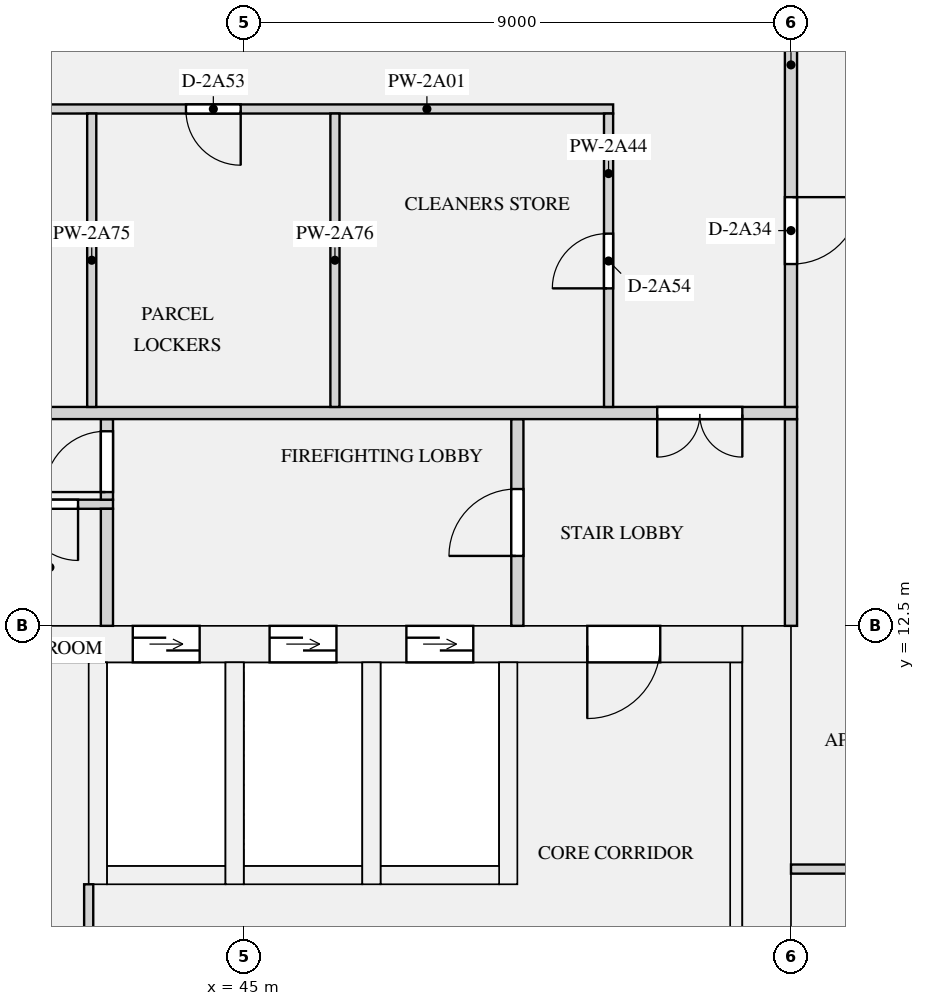
"""IFC4 building model, lengths in metres.
Left out: names, types, materials, properties, quantities, classifications, styles, units other than length and angle.
Written with IfcOpenShell. Run it as: python <this file> out.ifc"""

import sys

from ifc_helpers import new_model, si_unit, direction, frame, frame_2d, origin, place, context, subcontext, project, spatial, rectangle, extrude, element, fill, save


model = new_model("IFC4")
c1 = context("Model", 3, precision=1e-05, world=origin(), true_north=direction((0.0, 1.0)))
c2 = subcontext(c1, "Body", "Model", "MODEL_VIEW")
j1 = project(units=[si_unit("LENGTHUNIT", "METRE"), si_unit("PLANEANGLEUNIT", "RADIAN")], contexts=[c1])
p1 = place(None, origin())
s1 = spatial("IfcSite", under=j1, at=p1, CompositionType="ELEMENT")
p2 = place(p1, origin())
s2 = spatial("IfcBuilding", under=s1, at=p2, CompositionType="ELEMENT")
p3 = place(p2, frame((0.0, 0.0, 83.55)))
s3 = spatial("IfcBuildingStorey", under=s2, at=p3, CompositionType="ELEMENT", Elevation=83.55)
p4 = place(p3, frame((53.6, 0.0, 0.0), z_axis=(0.0, 0.0, 1.0), x_axis=(0.0, 1.0, 0.0)))
e1 = element("IfcWall", 1, at=p4, inside=s3, PredefinedType="SHEAR", context=c2, shape_type="SweptSolid", body=[
    extrude(rectangle(XDim=12.5, YDim=0.8, at=frame_2d((6.25, 0.0))), origin(), (0.0, 0.0, 1.0), 3.15),
])
p5 = place(p3, frame((18.8, 12.2, 0.0), z_axis=(0.0, 0.0, 1.0), x_axis=(1.0, 0.0, 0.0)))
e2 = element("IfcWall", 2, at=p5, inside=s3, PredefinedType="SHEAR", context=c2, shape_type="SweptSolid", body=[
    extrude(rectangle(XDim=34.4, YDim=0.6, at=frame_2d((17.2, 0.0))), origin(), (0.0, 0.0, 1.0), 3.15),
])
p6 = place(p5, frame((24.375, 0.0, 0.0)))
e3 = element("IfcOpeningElement", 3, at=p6, cuts=e2, PredefinedType="OPENING", context=c2, shape_type="SweptSolid", body=[
    extrude(rectangle(XDim=1.1, YDim=2.1, at=frame_2d((0.55, 1.05))), frame((0.0, 0.31, 0.0), z_axis=(0.0, -1.0, 0.0), x_axis=(1.0, 0.0, 0.0)), (0.0, 0.0, 1.0), 0.62),
])
p7 = place(p5, frame((26.625, 0.0, 0.0)))
e4 = element("IfcOpeningElement", 4, at=p7, cuts=e2, PredefinedType="OPENING", context=c2, shape_type="SweptSolid", body=[
    extrude(rectangle(XDim=1.1, YDim=2.1, at=frame_2d((0.55, 1.05))), frame((0.0, 0.31, 0.0), z_axis=(0.0, -1.0, 0.0), x_axis=(1.0, 0.0, 0.0)), (0.0, 0.0, 1.0), 0.62),
])
p8 = place(p5, frame((28.875, 0.0, 0.0)))
e5 = element("IfcOpeningElement", 5, at=p8, cuts=e2, PredefinedType="OPENING", context=c2, shape_type="SweptSolid", body=[
    extrude(rectangle(XDim=1.1, YDim=2.1, at=frame_2d((0.55, 1.05))), frame((0.0, 0.31, 0.0), z_axis=(0.0, -1.0, 0.0), x_axis=(1.0, 0.0, 0.0)), (0.0, 0.0, 1.0), 0.62),
])
p9 = place(p5, frame((14.25, 0.0, 0.0)))
e6 = element("IfcOpeningElement", 6, at=p9, cuts=e2, PredefinedType="OPENING", context=c2, shape_type="SweptSolid", body=[
    extrude(rectangle(XDim=0.9, YDim=2.1, at=frame_2d((0.45, 1.05))), frame((0.0, 0.31, 0.0), z_axis=(0.0, -1.0, 0.0), x_axis=(1.0, 0.0, 0.0)), (0.0, 0.0, 1.0), 0.62),
])
p10 = place(p5, frame((1.35, 0.0, 0.0)))
e7 = element("IfcOpeningElement", 7, at=p10, cuts=e2, PredefinedType="OPENING", context=c2, shape_type="SweptSolid", body=[
    extrude(rectangle(XDim=1.2, YDim=2.1, at=frame_2d((0.6, 1.05))), frame((0.0, 0.31, 0.0), z_axis=(0.0, -1.0, 0.0), x_axis=(1.0, 0.0, 0.0)), (0.0, 0.0, 1.0), 0.62),
])
p11 = place(p5, frame((31.85, 0.0, 0.0)))
e8 = element("IfcOpeningElement", 8, at=p11, cuts=e2, PredefinedType="OPENING", context=c2, shape_type="SweptSolid", body=[
    extrude(rectangle(XDim=1.2, YDim=2.1, at=frame_2d((0.6, 1.05))), frame((0.0, 0.31, 0.0), z_axis=(0.0, -1.0, 0.0), x_axis=(1.0, 0.0, 0.0)), (0.0, 0.0, 1.0), 0.62),
])
p12 = place(p3, frame((53.1, 1.0, 0.0), z_axis=(0.0, 0.0, 1.0), x_axis=(0.0, 1.0, 0.0)))
e9 = element("IfcWall", 9, at=p12, inside=s3, PredefinedType="SHEAR", context=c2, shape_type="SweptSolid", body=[
    extrude(rectangle(XDim=10.9, YDim=0.2, at=frame_2d((5.45, 0.0))), origin(), (0.0, 0.0, 1.0), 3.15),
])
p13 = place(p3, frame((42.75, 8.4, 0.0), z_axis=(0.0, 0.0, 1.0), x_axis=(1.0, 0.0, 0.0)))
e10 = element("IfcWall", 10, at=p13, inside=s3, PredefinedType="SHEAR", context=c2, shape_type="SweptSolid", body=[
    extrude(rectangle(XDim=1.95, YDim=0.3, at=frame_2d((0.975, 0.0))), origin(), (0.0, 0.0, 1.0), 3.15),
])
p14 = place(p3, frame((42.6, 8.25, 0.0), z_axis=(0.0, 0.0, 1.0), x_axis=(0.0, 1.0, 0.0)))
e11 = element("IfcWall", 11, at=p14, inside=s3, PredefinedType="SHEAR", context=c2, shape_type="SweptSolid", body=[
    extrude(rectangle(XDim=3.65, YDim=0.3, at=frame_2d((1.825, 0.0))), origin(), (0.0, 0.0, 1.0), 3.15),
])
p15 = place(p3, frame((45.0, 8.4, 0.0), z_axis=(0.0, 0.0, 1.0), x_axis=(1.0, 0.0, 0.0)))
e12 = element("IfcWall", 12, at=p15, inside=s3, PredefinedType="SHEAR", context=c2, shape_type="SweptSolid", body=[
    extrude(rectangle(XDim=1.95, YDim=0.3, at=frame_2d((0.975, 0.0))), origin(), (0.0, 0.0, 1.0), 3.15),
])
p16 = place(p3, frame((44.85, 8.25, 0.0), z_axis=(0.0, 0.0, 1.0), x_axis=(0.0, 1.0, 0.0)))
e13 = element("IfcWall", 13, at=p16, inside=s3, PredefinedType="SHEAR", context=c2, shape_type="SweptSolid", body=[
    extrude(rectangle(XDim=3.65, YDim=0.3, at=frame_2d((1.825, 0.0))), origin(), (0.0, 0.0, 1.0), 3.15),
])
p17 = place(p3, frame((47.25, 8.4, 0.0), z_axis=(0.0, 0.0, 1.0), x_axis=(1.0, 0.0, 0.0)))
e14 = element("IfcWall", 14, at=p17, inside=s3, PredefinedType="SHEAR", context=c2, shape_type="SweptSolid", body=[
    extrude(rectangle(XDim=1.95, YDim=0.3, at=frame_2d((0.975, 0.0))), origin(), (0.0, 0.0, 1.0), 3.15),
])
for number, where, z_axis, x_axis in (
    (15, (47.1, 8.25, 0.0), (0.0, 0.0, 1.0), (0.0, 1.0, 0.0)),
    (16, (49.35, 8.25, 0.0), (0.0, 0.0, 1.0), (0.0, 1.0, 0.0)),
):
    element("IfcWall", number, at=place(p3, frame(where, z_axis=z_axis, x_axis=x_axis)), inside=s3, PredefinedType="SHEAR", context=c2, shape_type="SweptSolid", body=[
        extrude(rectangle(XDim=3.65, YDim=0.3, at=frame_2d((1.825, 0.0))), origin(), (0.0, 0.0, 1.0), 3.15),
    ])
p18 = place(p3, frame((38.925, 14.5, 0.0), z_axis=(0.0, 0.0, 1.0), x_axis=(1.0, 0.0, 0.0)))
e17 = element("IfcWall", 17, at=p18, inside=s3, PredefinedType="PARTITIONING", context=c2, shape_type="SweptSolid", body=[
    extrude(rectangle(XDim=3.925, YDim=0.15, at=frame_2d((1.962, 0.0))), origin(), (0.0, 0.0, 1.0), 2.83),
])
p19 = place(p18, frame((0.575, 0.0, 0.0)))
e18 = element("IfcOpeningElement", 18, at=p19, cuts=e17, PredefinedType="OPENING", context=c2, shape_type="SweptSolid", body=[
    extrude(rectangle(XDim=0.9, YDim=2.1, at=frame_2d((0.45, 1.05))), frame((0.0, 0.085, 0.0), z_axis=(0.0, -1.0, 0.0), x_axis=(1.0, 0.0, 0.0)), (0.0, 0.0, 1.0), 0.17),
])
p20 = place(p18, frame((2.45, 0.0, 0.0)))
e19 = element("IfcOpeningElement", 19, at=p20, cuts=e17, PredefinedType="OPENING", context=c2, shape_type="SweptSolid", body=[
    extrude(rectangle(XDim=0.9, YDim=2.1, at=frame_2d((0.45, 1.05))), frame((0.0, 0.085, 0.0), z_axis=(0.0, -1.0, 0.0), x_axis=(1.0, 0.0, 0.0)), (0.0, 0.0, 1.0), 0.17),
])
p21 = place(p3, frame((42.45, 6.65, 0.0), z_axis=(0.0, 0.0, 1.0), x_axis=(0.0, 1.0, 0.0)))
e20 = element("IfcWall", 20, at=p21, inside=s3, PredefinedType="PARTITIONING", context=c2, shape_type="SweptSolid", body=[
    extrude(rectangle(XDim=1.6, YDim=0.15, at=frame_2d((0.8, 0.0))), origin(), (0.0, 0.0, 1.0), 2.83),
])
p22 = place(p3, frame((42.75, 12.5, 0.0), z_axis=(0.0, 0.0, 1.0), x_axis=(0.0, 1.0, 0.0)))
e21 = element("IfcWall", 21, at=p22, inside=s3, PredefinedType="PARTITIONING", context=c2, shape_type="SweptSolid", body=[
    extrude(rectangle(XDim=1.925, YDim=0.2, at=frame_2d((0.962, 0.0))), origin(), (0.0, 0.0, 1.0), 2.83),
])
p23 = place(p3, frame((49.5, 12.5, 0.0), z_axis=(0.0, 0.0, 1.0), x_axis=(0.0, 1.0, 0.0)))
e22 = element("IfcWall", 22, at=p23, inside=s3, PredefinedType="PARTITIONING", context=c2, shape_type="SweptSolid", body=[
    extrude(rectangle(XDim=3.4, YDim=0.2, at=frame_2d((1.7, 0.0))), origin(), (0.0, 0.0, 1.0), 2.83),
])
p24 = place(p23, frame((1.15, 0.0, 0.0)))
e23 = element("IfcOpeningElement", 23, at=p24, cuts=e22, PredefinedType="OPENING", context=c2, shape_type="SweptSolid", body=[
    extrude(rectangle(XDim=1.1, YDim=2.1, at=frame_2d((0.55, 1.05))), frame((0.0, 0.11, 0.0), z_axis=(0.0, -1.0, 0.0), x_axis=(1.0, 0.0, 0.0)), (0.0, 0.0, 1.0), 0.22),
])
p25 = place(p3, frame((54.0, 12.5, 0.0), z_axis=(0.0, 0.0, 1.0), x_axis=(0.0, 1.0, 0.0)))
e24 = element("IfcWall", 24, at=p25, inside=s3, PredefinedType="PARTITIONING", context=c2, shape_type="SweptSolid", body=[
    extrude(rectangle(XDim=3.4, YDim=0.2, at=frame_2d((1.7, 0.0))), origin(), (0.0, 0.0, 1.0), 2.83),
])
p26 = place(p3, frame((42.75, 14.575, 0.0), z_axis=(0.0, 0.0, 1.0), x_axis=(0.0, 1.0, 0.0)))
e25 = element("IfcWall", 25, at=p26, inside=s3, PredefinedType="PARTITIONING", context=c2, shape_type="SweptSolid", body=[
    extrude(rectangle(XDim=1.325, YDim=0.2, at=frame_2d((0.663, 0.0))), origin(), (0.0, 0.0, 1.0), 2.83),
])
p27 = place(p26, frame((0.125, 0.0, 0.0)))
e26 = element("IfcOpeningElement", 26, at=p27, cuts=e25, PredefinedType="OPENING", context=c2, shape_type="SweptSolid", body=[
    extrude(rectangle(XDim=1.0, YDim=2.1, at=frame_2d((0.5, 1.05))), frame((0.0, 0.11, 0.0), z_axis=(0.0, -1.0, 0.0), x_axis=(1.0, 0.0, 0.0)), (0.0, 0.0, 1.0), 0.22),
])
p28 = place(p3, frame((20.925, 21.0, 0.0), z_axis=(0.0, 0.0, 1.0), x_axis=(1.0, 0.0, 0.0)))
e27 = element("IfcWall", 27, at=p28, inside=s3, PredefinedType="PARTITIONING", context=c2, shape_type="SweptSolid", body=[
    extrude(rectangle(XDim=30.15, YDim=0.15, at=frame_2d((15.075, 0.0))), origin(), (0.0, 0.0, 1.0), 2.83),
])
p29 = place(p28, frame((2.875, 0.0, 0.0)))
e28 = element("IfcOpeningElement", 28, at=p29, cuts=e27, PredefinedType="OPENING", context=c2, shape_type="SweptSolid", body=[
    extrude(rectangle(XDim=0.9, YDim=2.1, at=frame_2d((0.45, 1.05))), frame((0.0, 0.085, 0.0), z_axis=(0.0, -1.0, 0.0), x_axis=(1.0, 0.0, 0.0)), (0.0, 0.0, 1.0), 0.17),
])
p30 = place(p28, frame((8.375, 0.0, 0.0)))
e29 = element("IfcOpeningElement", 29, at=p30, cuts=e27, PredefinedType="OPENING", context=c2, shape_type="SweptSolid", body=[
    extrude(rectangle(XDim=0.9, YDim=2.1, at=frame_2d((0.45, 1.05))), frame((0.0, 0.085, 0.0), z_axis=(0.0, -1.0, 0.0), x_axis=(1.0, 0.0, 0.0)), (0.0, 0.0, 1.0), 0.17),
])
p31 = place(p28, frame((13.375, 0.0, 0.0)))
e30 = element("IfcOpeningElement", 30, at=p31, cuts=e27, PredefinedType="OPENING", context=c2, shape_type="SweptSolid", body=[
    extrude(rectangle(XDim=0.9, YDim=2.1, at=frame_2d((0.45, 1.05))), frame((0.0, 0.085, 0.0), z_axis=(0.0, -1.0, 0.0), x_axis=(1.0, 0.0, 0.0)), (0.0, 0.0, 1.0), 0.17),
])
p32 = place(p28, frame((18.625, 0.0, 0.0)))
e31 = element("IfcOpeningElement", 31, at=p32, cuts=e27, PredefinedType="OPENING", context=c2, shape_type="SweptSolid", body=[
    extrude(rectangle(XDim=0.9, YDim=2.1, at=frame_2d((0.45, 1.05))), frame((0.0, 0.085, 0.0), z_axis=(0.0, -1.0, 0.0), x_axis=(1.0, 0.0, 0.0)), (0.0, 0.0, 1.0), 0.17),
])
p33 = place(p28, frame((23.125, 0.0, 0.0)))
e32 = element("IfcOpeningElement", 32, at=p33, cuts=e27, PredefinedType="OPENING", context=c2, shape_type="SweptSolid", body=[
    extrude(rectangle(XDim=0.9, YDim=2.1, at=frame_2d((0.45, 1.05))), frame((0.0, 0.085, 0.0), z_axis=(0.0, -1.0, 0.0), x_axis=(1.0, 0.0, 0.0)), (0.0, 0.0, 1.0), 0.17),
])
p34 = place(p3, frame((54.0, 8.5, 0.0), z_axis=(0.0, 0.0, 1.0), x_axis=(1.0, 0.0, 0.0)))
e33 = element("IfcWall", 33, at=p34, inside=s3, PredefinedType="PARTITIONING", context=c2, shape_type="SweptSolid", body=[
    extrude(rectangle(XDim=17.925, YDim=0.15, at=frame_2d((8.962, 0.0))), origin(), (0.0, 0.0, 1.0), 2.83),
])
p35 = place(p34, frame((1.8, 0.0, 0.0)))
e34 = element("IfcOpeningElement", 34, at=p35, cuts=e33, PredefinedType="OPENING", context=c2, shape_type="SweptSolid", body=[
    extrude(rectangle(XDim=0.9, YDim=2.1, at=frame_2d((0.45, 1.05))), frame((0.0, 0.085, 0.0), z_axis=(0.0, -1.0, 0.0), x_axis=(1.0, 0.0, 0.0)), (0.0, 0.0, 1.0), 0.17),
])
p36 = place(p34, frame((8.25, 0.0, 0.0)))
e35 = element("IfcOpeningElement", 35, at=p36, cuts=e33, PredefinedType="OPENING", context=c2, shape_type="SweptSolid", body=[
    extrude(rectangle(XDim=1.5, YDim=2.1, at=frame_2d((0.75, 1.05))), frame((0.0, 0.085, 0.0), z_axis=(0.0, -1.0, 0.0), x_axis=(1.0, 0.0, 0.0)), (0.0, 0.0, 1.0), 0.17),
])
p37 = place(p34, frame((15.3, 0.0, 0.0)))
e36 = element("IfcOpeningElement", 36, at=p37, cuts=e33, PredefinedType="OPENING", context=c2, shape_type="SweptSolid", body=[
    extrude(rectangle(XDim=0.9, YDim=2.1, at=frame_2d((0.45, 1.05))), frame((0.0, 0.085, 0.0), z_axis=(0.0, -1.0, 0.0), x_axis=(1.0, 0.0, 0.0)), (0.0, 0.0, 1.0), 0.17),
])
p38 = place(p3, frame((17.9, 16.0, 0.0), z_axis=(0.0, 0.0, 1.0), x_axis=(1.0, 0.0, 0.0)))
e37 = element("IfcWall", 37, at=p38, inside=s3, PredefinedType="PARTITIONING", context=c2, shape_type="SweptSolid", body=[
    extrude(rectangle(XDim=36.2, YDim=0.2, at=frame_2d((18.1, 0.0))), origin(), (0.0, 0.0, 1.0), 2.83),
])
p39 = place(p38, frame((0.9, 0.0, 0.0)))
e38 = element("IfcOpeningElement", 38, at=p39, cuts=e37, PredefinedType="OPENING", context=c2, shape_type="SweptSolid", body=[
    extrude(rectangle(XDim=1.4, YDim=2.1, at=frame_2d((0.7, 1.05))), frame((0.0, 0.11, 0.0), z_axis=(0.0, -1.0, 0.0), x_axis=(1.0, 0.0, 0.0)), (0.0, 0.0, 1.0), 0.22),
])
p40 = place(p38, frame((33.9, 0.0, 0.0)))
e39 = element("IfcOpeningElement", 39, at=p40, cuts=e37, PredefinedType="OPENING", context=c2, shape_type="SweptSolid", body=[
    extrude(rectangle(XDim=1.4, YDim=2.1, at=frame_2d((0.7, 1.05))), frame((0.0, 0.11, 0.0), z_axis=(0.0, -1.0, 0.0), x_axis=(1.0, 0.0, 0.0)), (0.0, 0.0, 1.0), 0.22),
])
p41 = place(p3, frame((54.0, 16.1, 0.0), z_axis=(0.0, 0.0, 1.0), x_axis=(0.0, 1.0, 0.0)))
e40 = element("IfcWall", 40, at=p41, inside=s3, PredefinedType="PARTITIONING", context=c2, shape_type="SweptSolid", body=[
    extrude(rectangle(XDim=7.8, YDim=0.2, at=frame_2d((3.9, 0.0))), origin(), (0.0, 0.0, 1.0), 2.83),
])
p42 = place(p41, frame((2.35, 0.0, 0.0)))
e41 = element("IfcOpeningElement", 41, at=p42, cuts=e40, PredefinedType="OPENING", context=c2, shape_type="SweptSolid", body=[
    extrude(rectangle(XDim=1.1, YDim=2.1, at=frame_2d((0.55, 1.05))), frame((0.0, 0.11, 0.0), z_axis=(0.0, -1.0, 0.0), x_axis=(1.0, 0.0, 0.0)), (0.0, 0.0, 1.0), 0.22),
])
p43 = place(p3, frame((51.0, 16.1, 0.0), z_axis=(0.0, 0.0, 1.0), x_axis=(0.0, 1.0, 0.0)))
e42 = element("IfcWall", 42, at=p43, inside=s3, PredefinedType="PARTITIONING", context=c2, shape_type="SweptSolid", body=[
    extrude(rectangle(XDim=4.825, YDim=0.15, at=frame_2d((2.413, 0.0))), origin(), (0.0, 0.0, 1.0), 2.83),
])
p44 = place(p43, frame((1.95, 0.0, 0.0)))
e43 = element("IfcOpeningElement", 43, at=p44, cuts=e42, PredefinedType="OPENING", context=c2, shape_type="SweptSolid", body=[
    extrude(rectangle(XDim=0.9, YDim=2.1, at=frame_2d((0.45, 1.05))), frame((0.0, 0.085, 0.0), z_axis=(0.0, -1.0, 0.0), x_axis=(1.0, 0.0, 0.0)), (0.0, 0.0, 1.0), 0.17),
])
for number, where, z_axis, x_axis in (
    (44, (42.5, 16.1, 0.0), (0.0, 0.0, 1.0), (0.0, 1.0, 0.0)),
    (45, (46.5, 16.1, 0.0), (0.0, 0.0, 1.0), (0.0, 1.0, 0.0)),
):
    element("IfcWall", number, at=place(p3, frame(where, z_axis=z_axis, x_axis=x_axis)), inside=s3, PredefinedType="PARTITIONING", context=c2, shape_type="SweptSolid", body=[
        extrude(rectangle(XDim=4.825, YDim=0.15, at=frame_2d((2.413, 0.0))), origin(), (0.0, 0.0, 1.0), 2.83),
    ])
p45 = place(p6, origin())
e46 = element("IfcDoor", 46, at=p45, inside=s3, OperationType="DOUBLE_DOOR_SLIDING", PredefinedType="DOOR", context=c2, shape_type="SweptSolid", body=[
    extrude(rectangle(XDim=1.1, YDim=2.1, at=frame_2d((0.55, 1.05))), frame((0.0, 0.025, 0.0), z_axis=(0.0, -1.0, 0.0), x_axis=(1.0, 0.0, 0.0)), (0.0, 0.0, 1.0), 0.05),
])
fill(e3, e46)
p46 = place(p7, origin())
e47 = element("IfcDoor", 47, at=p46, inside=s3, OperationType="DOUBLE_DOOR_SLIDING", PredefinedType="DOOR", context=c2, shape_type="SweptSolid", body=[
    extrude(rectangle(XDim=1.1, YDim=2.1, at=frame_2d((0.55, 1.05))), frame((0.0, 0.025, 0.0), z_axis=(0.0, -1.0, 0.0), x_axis=(1.0, 0.0, 0.0)), (0.0, 0.0, 1.0), 0.05),
])
fill(e4, e47)
p47 = place(p8, origin())
e48 = element("IfcDoor", 48, at=p47, inside=s3, OperationType="DOUBLE_DOOR_SLIDING", PredefinedType="DOOR", context=c2, shape_type="SweptSolid", body=[
    extrude(rectangle(XDim=1.1, YDim=2.1, at=frame_2d((0.55, 1.05))), frame((0.0, 0.025, 0.0), z_axis=(0.0, -1.0, 0.0), x_axis=(1.0, 0.0, 0.0)), (0.0, 0.0, 1.0), 0.05),
])
fill(e5, e48)
p48 = place(p20, frame((0.9, 0.0, 0.0), z_axis=(0.0, 0.0, 1.0), x_axis=(-1.0, 0.0, 0.0)))
e49 = element("IfcDoor", 49, at=p48, inside=s3, OperationType="SINGLE_SWING_LEFT", PredefinedType="DOOR", context=c2, shape_type="SweptSolid", body=[
    extrude(rectangle(XDim=0.9, YDim=2.1, at=frame_2d((0.45, 1.05))), frame((0.0, 0.025, 0.0), z_axis=(0.0, -1.0, 0.0), x_axis=(1.0, 0.0, 0.0)), (0.0, 0.0, 1.0), 0.05),
])
fill(e19, e49)
p49 = place(p11, frame((1.2, 0.0, 0.0), z_axis=(0.0, 0.0, 1.0), x_axis=(-1.0, 0.0, 0.0)))
e50 = element("IfcDoor", 50, at=p49, inside=s3, OperationType="SINGLE_SWING_RIGHT", PredefinedType="DOOR", context=c2, shape_type="SweptSolid", body=[
    extrude(rectangle(XDim=1.2, YDim=2.1, at=frame_2d((0.6, 1.05))), frame((0.0, 0.025, 0.0), z_axis=(0.0, -1.0, 0.0), x_axis=(1.0, 0.0, 0.0)), (0.0, 0.0, 1.0), 0.05),
])
fill(e8, e50)
p50 = place(p27, origin())
e51 = element("IfcDoor", 51, at=p50, inside=s3, OperationType="SINGLE_SWING_LEFT", PredefinedType="DOOR", context=c2, shape_type="SweptSolid", body=[
    extrude(rectangle(XDim=1.0, YDim=2.1, at=frame_2d((0.5, 1.05))), frame((0.0, 0.025, 0.0), z_axis=(0.0, -1.0, 0.0), x_axis=(1.0, 0.0, 0.0)), (0.0, 0.0, 1.0), 0.05),
])
fill(e26, e51)
p51 = place(p24, origin())
e52 = element("IfcDoor", 52, at=p51, inside=s3, OperationType="SINGLE_SWING_LEFT", PredefinedType="DOOR", context=c2, shape_type="SweptSolid", body=[
    extrude(rectangle(XDim=1.1, YDim=2.1, at=frame_2d((0.55, 1.05))), frame((0.0, 0.025, 0.0), z_axis=(0.0, -1.0, 0.0), x_axis=(1.0, 0.0, 0.0)), (0.0, 0.0, 1.0), 0.05),
])
fill(e23, e52)
p52 = place(p40, frame((1.4, 0.0, 0.0), z_axis=(0.0, 0.0, 1.0), x_axis=(-1.0, 0.0, 0.0)))
e53 = element("IfcDoor", 53, at=p52, inside=s3, OperationType="DOUBLE_DOOR_SINGLE_SWING", PredefinedType="DOOR", context=c2, shape_type="SweptSolid", body=[
    extrude(rectangle(XDim=1.4, YDim=2.1, at=frame_2d((0.7, 1.05))), frame((0.0, 0.025, 0.0), z_axis=(0.0, -1.0, 0.0), x_axis=(1.0, 0.0, 0.0)), (0.0, 0.0, 1.0), 0.05),
])
fill(e39, e53)
p53 = place(p42, frame((1.1, 0.0, 0.0), z_axis=(0.0, 0.0, 1.0), x_axis=(-1.0, 0.0, 0.0)))
e54 = element("IfcDoor", 54, at=p53, inside=s3, OperationType="SINGLE_SWING_LEFT", PredefinedType="DOOR", context=c2, shape_type="SweptSolid", body=[
    extrude(rectangle(XDim=1.1, YDim=2.1, at=frame_2d((0.55, 1.05))), frame((0.0, 0.025, 0.0), z_axis=(0.0, -1.0, 0.0), x_axis=(1.0, 0.0, 0.0)), (0.0, 0.0, 1.0), 0.05),
])
fill(e41, e54)
p54 = place(p33, frame((0.9, 0.0, 0.0), z_axis=(0.0, 0.0, 1.0), x_axis=(-1.0, 0.0, 0.0)))
e55 = element("IfcDoor", 55, at=p54, inside=s3, OperationType="SINGLE_SWING_LEFT", PredefinedType="DOOR", context=c2, shape_type="SweptSolid", body=[
    extrude(rectangle(XDim=0.9, YDim=2.1, at=frame_2d((0.45, 1.05))), frame((0.0, 0.025, 0.0), z_axis=(0.0, -1.0, 0.0), x_axis=(1.0, 0.0, 0.0)), (0.0, 0.0, 1.0), 0.05),
])
fill(e32, e55)
p55 = place(p44, origin())
e56 = element("IfcDoor", 56, at=p55, inside=s3, OperationType="SINGLE_SWING_LEFT", PredefinedType="DOOR", context=c2, shape_type="SweptSolid", body=[
    extrude(rectangle(XDim=0.9, YDim=2.1, at=frame_2d((0.45, 1.05))), frame((0.0, 0.025, 0.0), z_axis=(0.0, -1.0, 0.0), x_axis=(1.0, 0.0, 0.0)), (0.0, 0.0, 1.0), 0.05),
])
fill(e43, e56)
save(model, sys.argv[1])
